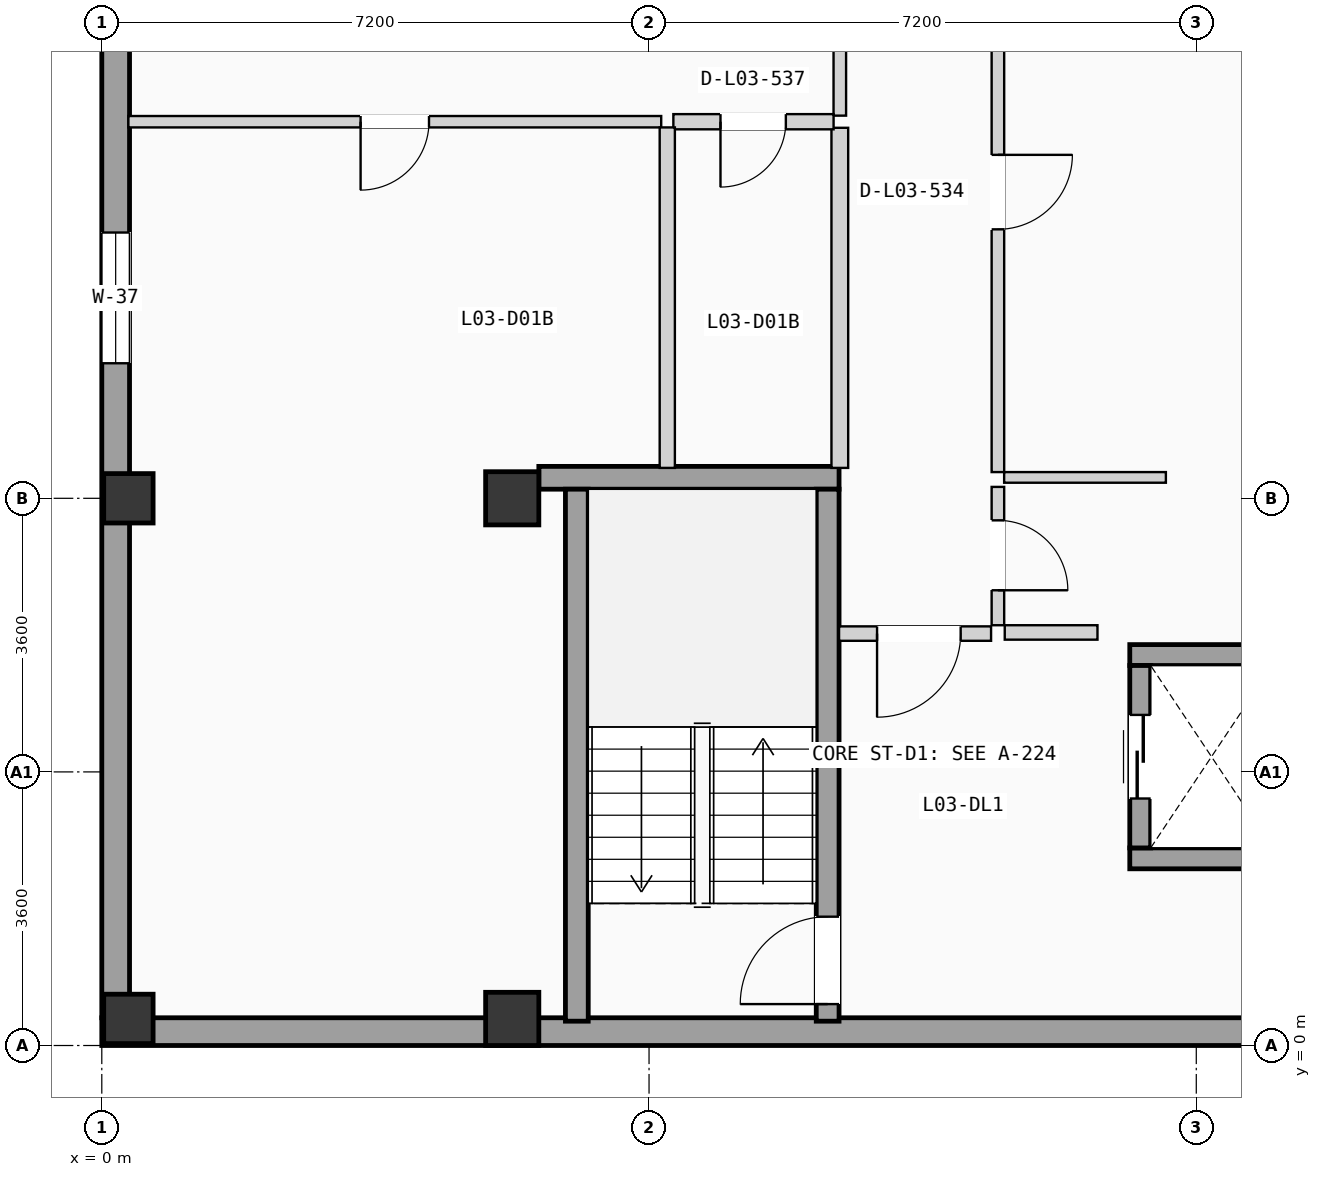
"""IFC4 building model, lengths in metres.
Left out: names, types, materials, properties, quantities, classifications, styles, units other than length and angle.
Written with IfcOpenShell. Run it as: python <this file> out.ifc"""

import sys

from ifc_helpers import new_model, si_unit, direction, frame, frame_2d, origin, origin_2d, place, context, subcontext, project, spatial, rectangle, extrude, element, fill, save


model = new_model("IFC4")
c1 = context("Model", 3, precision=1e-05, world=origin(), true_north=direction((0.0, 1.0)))
c2 = subcontext(c1, "Body", "Model", "MODEL_VIEW")
j1 = project(units=[si_unit("LENGTHUNIT", "METRE"), si_unit("PLANEANGLEUNIT", "RADIAN")], contexts=[c1])
p1 = place(None, origin())
s1 = spatial("IfcSite", under=j1, at=p1, CompositionType="ELEMENT")
p2 = place(p1, origin())
s2 = spatial("IfcBuilding", under=s1, at=p2, CompositionType="ELEMENT")
p3 = place(p2, frame((0.0, 0.0, 12.075)))
s3 = spatial("IfcBuildingStorey", under=s2, at=p3, CompositionType="ELEMENT", Elevation=12.075)
for number, where, z_axis, x_axis in (
    (1, (0.35, 0.35, 0.0), (0.0, 0.0, 1.0), (1.0, 0.0, 0.0)),
    (2, (0.35, 7.2, 0.0), (0.0, 0.0, 1.0), (1.0, 0.0, 0.0)),
):
    element("IfcColumn", number, at=place(p3, frame(where, z_axis=z_axis, x_axis=x_axis)), inside=s3, PredefinedType="COLUMN", context=c2, shape_type="SweptSolid", body=[
        extrude(rectangle(XDim=0.65, YDim=0.65, at=origin_2d()), origin(), (0.0, 0.0, 1.0), 3.15),
    ])
for number, where, z_axis, x_axis in (
    (3, (5.4, 0.35, 0.0), (0.0, 0.0, 1.0), (1.0, 0.0, 0.0)),
    (4, (5.4, 7.2, 0.0), (0.0, 0.0, 1.0), (1.0, 0.0, 0.0)),
):
    element("IfcColumn", number, at=place(p3, frame(where, z_axis=z_axis, x_axis=x_axis)), inside=s3, PredefinedType="COLUMN", context=c2, shape_type="SweptSolid", body=[
        extrude(rectangle(XDim=0.7, YDim=0.7, at=origin_2d()), origin(), (0.0, 0.0, 1.0), 3.15),
    ])
p4 = place(p3, frame((0.0, 0.183, 0.0), z_axis=(0.0, 0.0, 1.0), x_axis=(1.0, 0.0, 0.0)))
e5 = element("IfcWall", 5, at=p4, inside=s3, PredefinedType="SOLIDWALL", context=c2, shape_type="SweptSolid", body=[
    extrude(rectangle(XDim=21.6, YDim=0.365, at=frame_2d((10.8, 0.0))), origin(), (0.0, 0.0, 1.0), 2.89),
])
p5 = place(p3, frame((0.183, 0.365, 0.0), z_axis=(0.0, 0.0, 1.0), x_axis=(0.0, 1.0, 0.0)))
e6 = element("IfcWall", 6, at=p5, inside=s3, PredefinedType="SOLIDWALL", context=c2, shape_type="SweptSolid", body=[
    extrude(rectangle(XDim=49.67, YDim=0.365, at=frame_2d((24.835, 0.0))), origin(), (0.0, 0.0, 1.0), 2.89),
])
p6 = place(p5, frame((14.94, 0.0, 0.9)))
e7 = element("IfcOpeningElement", 7, at=p6, cuts=e6, PredefinedType="OPENING", context=c2, shape_type="SweptSolid", body=[
    extrude(rectangle(XDim=1.72, YDim=1.2, at=frame_2d((0.86, 0.6))), frame((0.0, 0.192, 0.0), z_axis=(0.0, -1.0, 0.0), x_axis=(1.0, 0.0, 0.0)), (0.0, 0.0, 1.0), 0.385),
])
p7 = place(p5, frame((8.612, 0.0, 0.855)))
e8 = element("IfcOpeningElement", 8, at=p7, cuts=e6, PredefinedType="OPENING", context=c2, shape_type="SweptSolid", body=[
    extrude(rectangle(XDim=1.72, YDim=1.35, at=frame_2d((0.86, 0.675))), frame((0.0, 0.192, 0.0), z_axis=(0.0, -1.0, 0.0), x_axis=(1.0, 0.0, 0.0)), (0.0, 0.0, 1.0), 0.385),
])
p8 = place(p5, frame((18.35, 0.0, 0.705)))
e9 = element("IfcOpeningElement", 9, at=p8, cuts=e6, PredefinedType="OPENING", context=c2, shape_type="SweptSolid", body=[
    extrude(rectangle(XDim=1.72, YDim=1.5, at=frame_2d((0.86, 0.75))), frame((0.0, 0.192, 0.0), z_axis=(0.0, -1.0, 0.0), x_axis=(1.0, 0.0, 0.0)), (0.0, 0.0, 1.0), 0.385),
])
p9 = place(p5, frame((31.175, 0.0, 0.555)))
e10 = element("IfcOpeningElement", 10, at=p9, cuts=e6, PredefinedType="OPENING", context=c2, shape_type="SweptSolid", body=[
    extrude(rectangle(XDim=1.72, YDim=1.65, at=frame_2d((0.86, 0.825))), frame((0.0, 0.192, 0.0), z_axis=(0.0, -1.0, 0.0), x_axis=(1.0, 0.0, 0.0)), (0.0, 0.0, 1.0), 0.385),
])
p10 = place(p5, frame((24.662, 0.0, 0.85)))
e11 = element("IfcOpeningElement", 11, at=p10, cuts=e6, PredefinedType="OPENING", context=c2, shape_type="SweptSolid", body=[
    extrude(rectangle(XDim=0.95, YDim=1.2, at=frame_2d((0.475, 0.6))), frame((0.0, 0.192, 0.0), z_axis=(0.0, -1.0, 0.0), x_axis=(1.0, 0.0, 0.0)), (0.0, 0.0, 1.0), 0.385),
])
p11 = place(p5, frame((38.245, 0.0, 0.9)))
e12 = element("IfcOpeningElement", 12, at=p11, cuts=e6, PredefinedType="OPENING", context=c2, shape_type="SweptSolid", body=[
    extrude(rectangle(XDim=1.85, YDim=1.2, at=frame_2d((0.925, 0.6))), frame((0.0, 0.192, 0.0), z_axis=(0.0, -1.0, 0.0), x_axis=(1.0, 0.0, 0.0)), (0.0, 0.0, 1.0), 0.385),
])
p12 = place(p3, frame((5.75, 7.47, 0.0), z_axis=(0.0, 0.0, 1.0), x_axis=(1.0, 0.0, 0.0)))
e13 = element("IfcWall", 13, at=p12, inside=s3, PredefinedType="SHEAR", context=c2, shape_type="SweptSolid", body=[
    extrude(rectangle(XDim=3.95, YDim=0.3, at=frame_2d((1.975, 0.0))), origin(), (0.0, 0.0, 1.0), 2.89),
])
p13 = place(p3, frame((6.25, 0.32, 0.0), z_axis=(0.0, 0.0, 1.0), x_axis=(0.0, 1.0, 0.0)))
e14 = element("IfcWall", 14, at=p13, inside=s3, PredefinedType="SHEAR", context=c2, shape_type="SweptSolid", body=[
    extrude(rectangle(XDim=7.0, YDim=0.3, at=frame_2d((3.5, 0.0))), origin(), (0.0, 0.0, 1.0), 2.89),
])
p14 = place(p3, frame((9.55, 0.32, 0.0), z_axis=(0.0, 0.0, 1.0), x_axis=(0.0, 1.0, 0.0)))
e15 = element("IfcWall", 15, at=p14, inside=s3, PredefinedType="SHEAR", context=c2, shape_type="SweptSolid", body=[
    extrude(rectangle(XDim=7.0, YDim=0.3, at=frame_2d((3.5, 0.0))), origin(), (0.0, 0.0, 1.0), 2.89),
])
p15 = place(p14, frame((0.225, 0.0, 0.0)))
e16 = element("IfcOpeningElement", 16, at=p15, cuts=e15, PredefinedType="OPENING", context=c2, shape_type="SweptSolid", body=[
    extrude(rectangle(XDim=1.15, YDim=2.12, at=frame_2d((0.575, 1.06))), frame((0.0, 0.16, 0.0), z_axis=(0.0, -1.0, 0.0), x_axis=(1.0, 0.0, 0.0)), (0.0, 0.0, 1.0), 0.32),
])
for number, where, z_axis, x_axis in (
    (17, (13.525, 2.462, 0.0), (0.0, 0.0, 1.0), (1.0, 0.0, 0.0)),
    (18, (13.525, 5.137, 0.0), (0.0, 0.0, 1.0), (1.0, 0.0, 0.0)),
):
    element("IfcWall", number, at=place(p3, frame(where, z_axis=z_axis, x_axis=x_axis)), inside=s3, PredefinedType="SHEAR", context=c2, shape_type="SweptSolid", body=[
        extrude(rectangle(XDim=2.15, YDim=0.275, at=frame_2d((1.075, 0.0))), origin(), (0.0, 0.0, 1.0), 2.89),
    ])
p16 = place(p3, frame((13.663, 2.6, 0.0), z_axis=(0.0, 0.0, 1.0), x_axis=(0.0, 1.0, 0.0)))
e19 = element("IfcWall", 19, at=p16, inside=s3, PredefinedType="SHEAR", context=c2, shape_type="SweptSolid", body=[
    extrude(rectangle(XDim=2.4, YDim=0.275, at=frame_2d((1.2, 0.0))), origin(), (0.0, 0.0, 1.0), 2.89),
])
p17 = place(p16, frame((0.65, 0.0, 0.0)))
e20 = element("IfcOpeningElement", 20, at=p17, cuts=e19, PredefinedType="OPENING", context=c2, shape_type="SweptSolid", body=[
    extrude(rectangle(XDim=1.1, YDim=2.15, at=frame_2d((0.55, 1.075))), frame((0.0, 0.147, 0.0), z_axis=(0.0, -1.0, 0.0), x_axis=(1.0, 0.0, 0.0)), (0.0, 0.0, 1.0), 0.295),
])
p18 = place(p3, frame((11.88, 5.435, 0.0), z_axis=(0.0, 0.0, 1.0), x_axis=(1.0, 0.0, 0.0)))
e21 = element("IfcWall", 21, at=p18, inside=s3, PredefinedType="PARTITIONING", context=c2, shape_type="SweptSolid", body=[
    extrude(rectangle(XDim=1.22, YDim=0.19, at=frame_2d((0.61, 0.0))), origin(), (0.0, 0.0, 1.0), 2.87),
])
p19 = place(p3, frame((9.7, 5.42, 0.0), z_axis=(0.0, 0.0, 1.0), x_axis=(1.0, 0.0, 0.0)))
e22 = element("IfcWall", 22, at=p19, inside=s3, PredefinedType="PARTITIONING", context=c2, shape_type="SweptSolid", body=[
    extrude(rectangle(XDim=2.0, YDim=0.19, at=frame_2d((1.0, 0.0))), origin(), (0.0, 0.0, 1.0), 2.87),
])
p20 = place(p19, frame((0.5, 0.0, 0.0)))
e23 = element("IfcOpeningElement", 23, at=p20, cuts=e22, PredefinedType="OPENING", context=c2, shape_type="SweptSolid", body=[
    extrude(rectangle(XDim=1.1, YDim=2.12, at=frame_2d((0.55, 1.06))), frame((0.0, 0.105, 0.0), z_axis=(0.0, -1.0, 0.0), x_axis=(1.0, 0.0, 0.0)), (0.0, 0.0, 1.0), 0.21),
])
p21 = place(p3, frame((11.79, 5.53, 0.0), z_axis=(0.0, 0.0, 1.0), x_axis=(0.0, 1.0, 0.0)))
e24 = element("IfcWall", 24, at=p21, inside=s3, PredefinedType="PARTITIONING", context=c2, shape_type="SweptSolid", body=[
    extrude(rectangle(XDim=1.82, YDim=0.165, at=frame_2d((0.91, 0.0))), origin(), (0.0, 0.0, 1.0), 2.87),
])
p22 = place(p21, frame((0.46, 0.0, 0.0)))
e25 = element("IfcOpeningElement", 25, at=p22, cuts=e24, PredefinedType="OPENING", context=c2, shape_type="SweptSolid", body=[
    extrude(rectangle(XDim=0.92, YDim=2.04, at=frame_2d((0.46, 1.02))), frame((0.0, 0.093, 0.0), z_axis=(0.0, -1.0, 0.0), x_axis=(1.0, 0.0, 0.0)), (0.0, 0.0, 1.0), 0.185),
])
p23 = place(p3, frame((11.872, 7.475, 0.0), z_axis=(0.0, 0.0, 1.0), x_axis=(1.0, 0.0, 0.0)))
e26 = element("IfcWall", 26, at=p23, inside=s3, PredefinedType="PARTITIONING", context=c2, shape_type="SweptSolid", body=[
    extrude(rectangle(XDim=2.128, YDim=0.14, at=frame_2d((1.064, 0.0))), origin(), (0.0, 0.0, 1.0), 2.87),
])
p24 = place(p3, frame((9.71, 12.235, 0.0), z_axis=(0.0, 0.0, 1.0), x_axis=(0.0, 1.0, 0.0)))
e27 = element("IfcWall", 27, at=p24, inside=s3, PredefinedType="PARTITIONING", context=c2, shape_type="SweptSolid", body=[
    extrude(rectangle(XDim=5.424, YDim=0.165, at=frame_2d((2.712, 0.0))), origin(), (0.0, 0.0, 1.0), 2.87),
])
p25 = place(p24, frame((2.207, 0.0, 0.0)))
e28 = element("IfcOpeningElement", 28, at=p25, cuts=e27, PredefinedType="OPENING", context=c2, shape_type="SweptSolid", body=[
    extrude(rectangle(XDim=1.01, YDim=2.11, at=frame_2d((0.505, 1.055))), frame((0.0, 0.093, 0.0), z_axis=(0.0, -1.0, 0.0), x_axis=(1.0, 0.0, 0.0)), (0.0, 0.0, 1.0), 0.185),
])
p26 = place(p3, frame((9.71, 7.6, 0.0), z_axis=(0.0, 0.0, 1.0), x_axis=(0.0, 1.0, 0.0)))
e29 = element("IfcWall", 29, at=p26, inside=s3, PredefinedType="PLUMBINGWALL", context=c2, shape_type="SweptSolid", body=[
    extrude(rectangle(XDim=4.475, YDim=0.22, at=frame_2d((2.237, 0.0))), origin(), (0.0, 0.0, 1.0), 2.87),
])
p27 = place(p3, frame((11.79, 7.545, 0.0), z_axis=(0.0, 0.0, 1.0), x_axis=(0.0, 1.0, 0.0)))
e30 = element("IfcWall", 30, at=p27, inside=s3, PredefinedType="PARTITIONING", context=c2, shape_type="SweptSolid", body=[
    extrude(rectangle(XDim=7.312, YDim=0.165, at=frame_2d((3.656, 0.0))), origin(), (0.0, 0.0, 1.0), 2.87),
])
p28 = place(p27, frame((3.194, 0.0, 0.0)))
e31 = element("IfcOpeningElement", 31, at=p28, cuts=e30, PredefinedType="OPENING", context=c2, shape_type="SweptSolid", body=[
    extrude(rectangle(XDim=0.98, YDim=2.08, at=frame_2d((0.49, 1.04))), frame((0.0, 0.093, 0.0), z_axis=(0.0, -1.0, 0.0), x_axis=(1.0, 0.0, 0.0)), (0.0, 0.0, 1.0), 0.185),
])
p29 = place(p3, frame((7.52, 12.155, 0.0), z_axis=(0.0, 0.0, 1.0), x_axis=(1.0, 0.0, 0.0)))
e32 = element("IfcWall", 32, at=p29, inside=s3, PredefinedType="PLUMBINGWALL", context=c2, shape_type="SweptSolid", body=[
    extrude(rectangle(XDim=2.108, YDim=0.2, at=frame_2d((1.054, 0.0))), origin(), (0.0, 0.0, 1.0), 2.87),
])
p30 = place(p29, frame((0.62, 0.0, 0.0)))
e33 = element("IfcOpeningElement", 33, at=p30, cuts=e32, PredefinedType="OPENING", context=c2, shape_type="SweptSolid", body=[
    extrude(rectangle(XDim=0.86, YDim=2.0, at=frame_2d((0.43, 1.0))), frame((0.0, 0.11, 0.0), z_axis=(0.0, -1.0, 0.0), x_axis=(1.0, 0.0, 0.0)), (0.0, 0.0, 1.0), 0.22),
])
p31 = place(p3, frame((0.35, 12.155, 0.0), z_axis=(0.0, 0.0, 1.0), x_axis=(1.0, 0.0, 0.0)))
e34 = element("IfcWall", 34, at=p31, inside=s3, PredefinedType="PARTITIONING", context=c2, shape_type="SweptSolid", body=[
    extrude(rectangle(XDim=7.01, YDim=0.15, at=frame_2d((3.505, 0.0))), origin(), (0.0, 0.0, 1.0), 2.87),
])
p32 = place(p31, frame((3.055, 0.0, 0.0)))
e35 = element("IfcOpeningElement", 35, at=p32, cuts=e34, PredefinedType="OPENING", context=c2, shape_type="SweptSolid", body=[
    extrude(rectangle(XDim=0.9, YDim=2.04, at=frame_2d((0.45, 1.02))), frame((0.0, 0.085, 0.0), z_axis=(0.0, -1.0, 0.0), x_axis=(1.0, 0.0, 0.0)), (0.0, 0.0, 1.0), 0.17),
])
p33 = place(p3, frame((7.44, 7.6, 0.0), z_axis=(0.0, 0.0, 1.0), x_axis=(0.0, 1.0, 0.0)))
e36 = element("IfcWall", 36, at=p33, inside=s3, PredefinedType="PLUMBINGWALL", context=c2, shape_type="SweptSolid", body=[
    extrude(rectangle(XDim=4.48, YDim=0.2, at=frame_2d((2.24, 0.0))), origin(), (0.0, 0.0, 1.0), 2.87),
])
p34 = place(p7, origin())
e37 = element("IfcWindow", 37, at=p34, inside=s3, PartitioningType="DOUBLE_PANEL_VERTICAL", PredefinedType="WINDOW", context=c2, shape_type="SweptSolid", body=[
    extrude(rectangle(XDim=1.72, YDim=1.35, at=frame_2d((0.86, 0.675))), frame((0.0, 0.03, 0.0), z_axis=(0.0, -1.0, 0.0), x_axis=(1.0, 0.0, 0.0)), (0.0, 0.0, 1.0), 0.06),
])
fill(e8, e37)
p35 = place(p15, origin())
e38 = element("IfcDoor", 38, at=p35, inside=s3, OperationType="SINGLE_SWING_LEFT", PredefinedType="DOOR", context=c2, shape_type="SweptSolid", body=[
    extrude(rectangle(XDim=1.15, YDim=2.12, at=frame_2d((0.575, 1.06))), frame((0.0, 0.025, 0.0), z_axis=(0.0, -1.0, 0.0), x_axis=(1.0, 0.0, 0.0)), (0.0, 0.0, 1.0), 0.05),
])
fill(e16, e38)
p36 = place(p17, origin())
e39 = element("IfcDoor", 39, at=p36, inside=s3, OperationType="SLIDING_TO_LEFT", PredefinedType="DOOR", context=c2, shape_type="SweptSolid", body=[
    extrude(rectangle(XDim=1.1, YDim=2.15, at=frame_2d((0.55, 1.075))), frame((0.0, 0.025, 0.0), z_axis=(0.0, -1.0, 0.0), x_axis=(1.0, 0.0, 0.0)), (0.0, 0.0, 1.0), 0.05),
])
fill(e20, e39)
p37 = place(p20, frame((1.1, 0.0, 0.0), z_axis=(0.0, 0.0, 1.0), x_axis=(-1.0, 0.0, 0.0)))
e40 = element("IfcDoor", 40, at=p37, inside=s3, OperationType="SINGLE_SWING_LEFT", PredefinedType="DOOR", context=c2, shape_type="SweptSolid", body=[
    extrude(rectangle(XDim=1.1, YDim=2.12, at=frame_2d((0.55, 1.06))), frame((0.0, 0.025, 0.0), z_axis=(0.0, -1.0, 0.0), x_axis=(1.0, 0.0, 0.0)), (0.0, 0.0, 1.0), 0.05),
])
fill(e23, e40)
p38 = place(p22, frame((0.92, 0.0, 0.0), z_axis=(0.0, 0.0, 1.0), x_axis=(-1.0, 0.0, 0.0)))
e41 = element("IfcDoor", 41, at=p38, inside=s3, OperationType="SINGLE_SWING_LEFT", PredefinedType="DOOR", context=c2, shape_type="SweptSolid", body=[
    extrude(rectangle(XDim=0.92, YDim=2.04, at=frame_2d((0.46, 1.02))), frame((0.0, 0.025, 0.0), z_axis=(0.0, -1.0, 0.0), x_axis=(1.0, 0.0, 0.0)), (0.0, 0.0, 1.0), 0.05),
])
fill(e25, e41)
p39 = place(p28, frame((0.98, 0.0, 0.0), z_axis=(0.0, 0.0, 1.0), x_axis=(-1.0, 0.0, 0.0)))
e42 = element("IfcDoor", 42, at=p39, inside=s3, OperationType="SINGLE_SWING_RIGHT", PredefinedType="DOOR", context=c2, shape_type="SweptSolid", body=[
    extrude(rectangle(XDim=0.98, YDim=2.08, at=frame_2d((0.49, 1.04))), frame((0.0, 0.025, 0.0), z_axis=(0.0, -1.0, 0.0), x_axis=(1.0, 0.0, 0.0)), (0.0, 0.0, 1.0), 0.05),
])
fill(e31, e42)
p40 = place(p30, frame((0.86, 0.0, 0.0), z_axis=(0.0, 0.0, 1.0), x_axis=(-1.0, 0.0, 0.0)))
e43 = element("IfcDoor", 43, at=p40, inside=s3, OperationType="SINGLE_SWING_LEFT", PredefinedType="DOOR", context=c2, shape_type="SweptSolid", body=[
    extrude(rectangle(XDim=0.86, YDim=2.0, at=frame_2d((0.43, 1.0))), frame((0.0, 0.025, 0.0), z_axis=(0.0, -1.0, 0.0), x_axis=(1.0, 0.0, 0.0)), (0.0, 0.0, 1.0), 0.05),
])
fill(e33, e43)
p41 = place(p32, frame((0.9, 0.0, 0.0), z_axis=(0.0, 0.0, 1.0), x_axis=(-1.0, 0.0, 0.0)))
e44 = element("IfcDoor", 44, at=p41, inside=s3, OperationType="SINGLE_SWING_LEFT", PredefinedType="DOOR", context=c2, shape_type="SweptSolid", body=[
    extrude(rectangle(XDim=0.9, YDim=2.04, at=frame_2d((0.45, 1.02))), frame((0.0, 0.025, 0.0), z_axis=(0.0, -1.0, 0.0), x_axis=(1.0, 0.0, 0.0)), (0.0, 0.0, 1.0), 0.05),
])
fill(e35, e44)
save(model, sys.argv[1])
